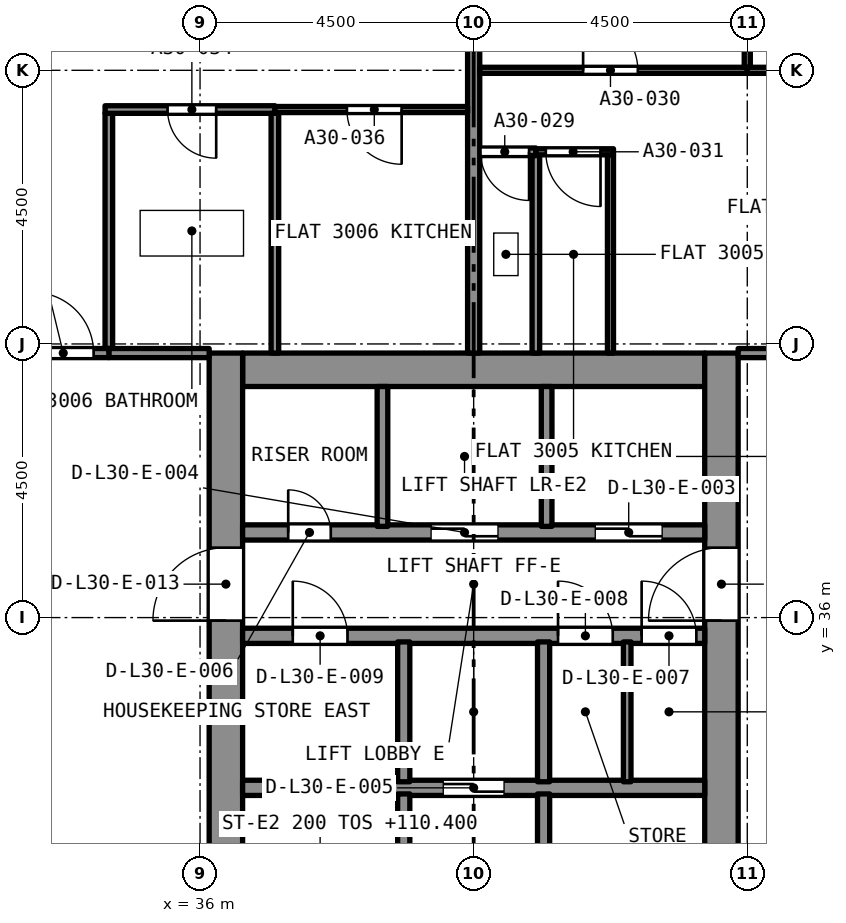
"""IFC4 building model, lengths in metres.
Left out: names, types, materials, properties, quantities, classifications, styles, units other than length and angle.
Written with IfcOpenShell. Run it as: python <this file> out.ifc"""

import sys

from ifc_helpers import new_model, si_unit, direction, frame, frame_2d, origin, place, context, subcontext, project, spatial, rectangle, extrude, element, fill, save


model = new_model("IFC4")
c1 = context("Model", 3, precision=1e-05, world=origin(), true_north=direction((0.0, 1.0)))
c2 = subcontext(c1, "Body", "Model", "MODEL_VIEW")
j1 = project(units=[si_unit("LENGTHUNIT", "METRE"), si_unit("PLANEANGLEUNIT", "RADIAN")], contexts=[c1])
p1 = place(None, origin())
s1 = spatial("IfcSite", under=j1, at=p1, CompositionType="ELEMENT")
p2 = place(p1, origin())
s2 = spatial("IfcBuilding", under=s1, at=p2, CompositionType="ELEMENT")
p3 = place(p2, frame((0.0, 0.0, 108.8)))
s3 = spatial("IfcBuildingStorey", under=s2, at=p3, CompositionType="ELEMENT", Elevation=108.8)
p4 = place(p3, frame((36.7, 40.075, 0.0), z_axis=(0.0, 0.0, 1.0), x_axis=(1.0, 0.0, 0.0)))
e1 = element("IfcWall", 1, at=p4, inside=s3, PredefinedType="SOLIDWALL", context=c2, shape_type="SweptSolid", body=[
    extrude(rectangle(XDim=7.6, YDim=0.55, at=frame_2d((3.8, 0.0))), origin(), (0.0, 0.0, 1.0), 3.2),
])
p5 = place(p3, frame((36.425, 27.15, 0.0), z_axis=(0.0, 0.0, 1.0), x_axis=(0.0, 1.0, 0.0)))
e2 = element("IfcWall", 2, at=p5, inside=s3, PredefinedType="SOLIDWALL", context=c2, shape_type="SweptSolid", body=[
    extrude(rectangle(XDim=13.2, YDim=0.55, at=frame_2d((6.6, 0.0))), origin(), (0.0, 0.0, 1.0), 3.2),
])
p6 = place(p5, frame((8.8, 0.0, 0.0)))
e3 = element("IfcOpeningElement", 3, at=p6, cuts=e2, PredefinedType="OPENING", context=c2, shape_type="SweptSolid", body=[
    extrude(rectangle(XDim=1.2, YDim=2.1, at=frame_2d((0.6, 1.05))), frame((0.0, 0.285, 0.0), z_axis=(0.0, -1.0, 0.0), x_axis=(1.0, 0.0, 0.0)), (0.0, 0.0, 1.0), 0.57),
])
p7 = place(p3, frame((44.575, 27.15, 0.0), z_axis=(0.0, 0.0, 1.0), x_axis=(0.0, 1.0, 0.0)))
e4 = element("IfcWall", 4, at=p7, inside=s3, PredefinedType="SOLIDWALL", context=c2, shape_type="SweptSolid", body=[
    extrude(rectangle(XDim=13.2, YDim=0.55, at=frame_2d((6.6, 0.0))), origin(), (0.0, 0.0, 1.0), 3.2),
])
p8 = place(p7, frame((8.8, 0.0, 0.0)))
e5 = element("IfcOpeningElement", 5, at=p8, cuts=e4, PredefinedType="OPENING", context=c2, shape_type="SweptSolid", body=[
    extrude(rectangle(XDim=1.2, YDim=2.1, at=frame_2d((0.6, 1.05))), frame((0.0, 0.285, 0.0), z_axis=(0.0, -1.0, 0.0), x_axis=(1.0, 0.0, 0.0)), (0.0, 0.0, 1.0), 0.57),
])
p9 = place(p3, frame((41.523, 43.66, 0.0), z_axis=(0.0, 0.0, 1.0), x_axis=(-1.0, 0.0, 0.0)))
e6 = element("IfcWall", 6, at=p9, inside=s3, PredefinedType="PARTITIONING", context=c2, shape_type="SweptSolid", body=[
    extrude(rectangle(XDim=0.923, YDim=0.125, at=frame_2d((0.461, 0.0))), origin(), (0.0, 0.0, 1.0), 2.9),
])
p10 = place(p9, frame((0.111, 0.0, 0.0)))
e7 = element("IfcOpeningElement", 7, at=p10, cuts=e6, PredefinedType="OPENING", context=c2, shape_type="SweptSolid", body=[
    extrude(rectangle(XDim=0.8, YDim=2.1, at=frame_2d((0.4, 1.05))), frame((0.0, 0.073, 0.0), z_axis=(0.0, -1.0, 0.0), x_axis=(1.0, 0.0, 0.0)), (0.0, 0.0, 1.0), 0.145),
])
p11 = place(p3, frame((41.523, 40.35, 0.0), z_axis=(0.0, 0.0, 1.0), x_axis=(0.0, 1.0, 0.0)))
e8 = element("IfcWall", 8, at=p11, inside=s3, PredefinedType="PARTITIONING", context=c2, shape_type="SweptSolid", body=[
    extrude(rectangle(XDim=3.247, YDim=0.125, at=frame_2d((1.624, 0.0))), origin(), (0.0, 0.0, 1.0), 2.9),
])
p12 = place(p3, frame((40.5, 40.35, 0.0), z_axis=(0.0, 0.0, 1.0), x_axis=(0.0, 1.0, 0.0)))
e9 = element("IfcWall", 9, at=p12, inside=s3, PredefinedType="PARTITIONING", context=c2, shape_type="SweptSolid", body=[
    extrude(rectangle(XDim=8.575, YDim=0.2, at=frame_2d((4.288, 0.0))), origin(), (0.0, 0.0, 1.0), 2.9),
])
p13 = place(p3, frame((40.6, 45.0, 0.0), z_axis=(0.0, 0.0, 1.0), x_axis=(1.0, 0.0, 0.0)))
e10 = element("IfcWall", 10, at=p13, inside=s3, PredefinedType="PARTITIONING", context=c2, shape_type="SweptSolid", body=[
    extrude(rectangle(XDim=4.4, YDim=0.1, at=frame_2d((2.2, 0.0))), origin(), (0.0, 0.0, 1.0), 2.9),
])
p14 = place(p13, frame((1.7, 0.0, 0.0)))
e11 = element("IfcOpeningElement", 11, at=p14, cuts=e10, PredefinedType="OPENING", context=c2, shape_type="SweptSolid", body=[
    extrude(rectangle(XDim=0.9, YDim=2.1, at=frame_2d((0.45, 1.05))), frame((0.0, 0.06, 0.0), z_axis=(0.0, -1.0, 0.0), x_axis=(1.0, 0.0, 0.0)), (0.0, 0.0, 1.0), 0.12),
])
p15 = place(p3, frame((45.0, 45.05, 0.0), z_axis=(0.0, 0.0, 1.0), x_axis=(0.0, 1.0, 0.0)))
e12 = element("IfcWall", 12, at=p15, inside=s3, PredefinedType="PARTITIONING", context=c2, shape_type="SweptSolid", body=[
    extrude(rectangle(XDim=3.828, YDim=0.1, at=frame_2d((1.914, 0.0))), origin(), (0.0, 0.0, 1.0), 2.9),
])
p16 = place(p3, frame((42.75, 40.35, 0.0), z_axis=(0.0, 0.0, 1.0), x_axis=(0.0, 1.0, 0.0)))
e13 = element("IfcWall", 13, at=p16, inside=s3, PredefinedType="PARTITIONING", context=c2, shape_type="SweptSolid", body=[
    extrude(rectangle(XDim=3.26, YDim=0.1, at=frame_2d((1.63, 0.0))), origin(), (0.0, 0.0, 1.0), 2.9),
])
p17 = place(p3, frame((42.8, 43.66, 0.0), z_axis=(0.0, 0.0, 1.0), x_axis=(-1.0, 0.0, 0.0)))
e14 = element("IfcWall", 14, at=p17, inside=s3, PredefinedType="PARTITIONING", context=c2, shape_type="SweptSolid", body=[
    extrude(rectangle(XDim=1.277, YDim=0.1, at=frame_2d((0.639, 0.0))), origin(), (0.0, 0.0, 1.0), 2.9),
])
p18 = place(p17, frame((0.214, 0.0, 0.0)))
e15 = element("IfcOpeningElement", 15, at=p18, cuts=e14, PredefinedType="OPENING", context=c2, shape_type="SweptSolid", body=[
    extrude(rectangle(XDim=0.9, YDim=2.1, at=frame_2d((0.45, 1.05))), frame((0.0, 0.06, 0.0), z_axis=(0.0, -1.0, 0.0), x_axis=(1.0, 0.0, 0.0)), (0.0, 0.0, 1.0), 0.12),
])
p19 = place(p3, frame((45.0, 45.0, 0.0), z_axis=(0.0, 0.0, 1.0), x_axis=(1.0, 0.0, 0.0)))
e16 = element("IfcWall", 16, at=p19, inside=s3, PredefinedType="PARTITIONING", context=c2, shape_type="SweptSolid", body=[
    extrude(rectangle(XDim=3.878, YDim=0.1, at=frame_2d((1.939, 0.0))), origin(), (0.0, 0.0, 1.0), 2.9),
])
p20 = place(p19, frame((1.462, 0.0, 0.0)))
e17 = element("IfcOpeningElement", 17, at=p20, cuts=e16, PredefinedType="OPENING", context=c2, shape_type="SweptSolid", body=[
    extrude(rectangle(XDim=1.0, YDim=2.1, at=frame_2d((0.5, 1.05))), frame((0.0, 0.06, 0.0), z_axis=(0.0, -1.0, 0.0), x_axis=(1.0, 0.0, 0.0)), (0.0, 0.0, 1.0), 0.12),
])
p21 = place(p3, frame((44.85, 40.35, 0.0), z_axis=(0.0, 0.0, 1.0), x_axis=(1.0, 0.0, 0.0)))
e18 = element("IfcWall", 18, at=p21, inside=s3, PredefinedType="PARTITIONING", context=c2, shape_type="SweptSolid", body=[
    extrude(rectangle(XDim=4.075, YDim=0.15, at=frame_2d((2.038, 0.0))), origin(), (0.0, 0.0, 1.0), 2.9),
])
p22 = place(p21, frame((1.9, 0.0, 0.0)))
e19 = element("IfcOpeningElement", 19, at=p22, cuts=e18, PredefinedType="OPENING", context=c2, shape_type="SweptSolid", body=[
    extrude(rectangle(XDim=1.0, YDim=2.1, at=frame_2d((0.5, 1.05))), frame((0.0, 0.085, 0.0), z_axis=(0.0, -1.0, 0.0), x_axis=(1.0, 0.0, 0.0)), (0.0, 0.0, 1.0), 0.17),
])
p23 = place(p3, frame((34.5, 40.425, 0.0), z_axis=(0.0, 0.0, 1.0), x_axis=(0.0, 1.0, 0.0)))
e20 = element("IfcWall", 20, at=p23, inside=s3, PredefinedType="PARTITIONING", context=c2, shape_type="SweptSolid", body=[
    extrude(rectangle(XDim=3.867, YDim=0.125, at=frame_2d((1.934, 0.0))), origin(), (0.0, 0.0, 1.0), 2.9),
])
p24 = place(p3, frame((37.231, 44.355, 0.0), z_axis=(0.0, 0.0, 1.0), x_axis=(-1.0, 0.0, 0.0)))
e21 = element("IfcWall", 21, at=p24, inside=s3, PredefinedType="PARTITIONING", context=c2, shape_type="SweptSolid", body=[
    extrude(rectangle(XDim=2.794, YDim=0.125, at=frame_2d((1.397, 0.0))), origin(), (0.0, 0.0, 1.0), 2.9),
])
p25 = place(p24, frame((0.966, 0.0, 0.0)))
e22 = element("IfcOpeningElement", 22, at=p25, cuts=e21, PredefinedType="OPENING", context=c2, shape_type="SweptSolid", body=[
    extrude(rectangle(XDim=0.8, YDim=2.1, at=frame_2d((0.4, 1.05))), frame((0.0, 0.073, 0.0), z_axis=(0.0, -1.0, 0.0), x_axis=(1.0, 0.0, 0.0)), (0.0, 0.0, 1.0), 0.145),
])
p26 = place(p3, frame((37.231, 40.35, 0.0), z_axis=(0.0, 0.0, 1.0), x_axis=(0.0, 1.0, 0.0)))
e23 = element("IfcWall", 23, at=p26, inside=s3, PredefinedType="PARTITIONING", context=c2, shape_type="SweptSolid", body=[
    extrude(rectangle(XDim=3.942, YDim=0.125, at=frame_2d((1.971, 0.0))), origin(), (0.0, 0.0, 1.0), 2.9),
])
p27 = place(p3, frame((34.5, 40.35, 0.0), z_axis=(0.0, 0.0, 1.0), x_axis=(1.0, 0.0, 0.0)))
e24 = element("IfcWall", 24, at=p27, inside=s3, PredefinedType="PARTITIONING", context=c2, shape_type="SweptSolid", body=[
    extrude(rectangle(XDim=1.65, YDim=0.15, at=frame_2d((0.825, 0.0))), origin(), (0.0, 0.0, 1.0), 2.9),
])
p28 = place(p3, frame((40.4, 44.355, 0.0), z_axis=(0.0, 0.0, 1.0), x_axis=(-1.0, 0.0, 0.0)))
e25 = element("IfcWall", 25, at=p28, inside=s3, PredefinedType="PARTITIONING", context=c2, shape_type="SweptSolid", body=[
    extrude(rectangle(XDim=3.168, YDim=0.1, at=frame_2d((1.584, 0.0))), origin(), (0.0, 0.0, 1.0), 2.9),
])
p29 = place(p28, frame((1.084, 0.0, 0.0)))
e26 = element("IfcOpeningElement", 26, at=p29, cuts=e25, PredefinedType="OPENING", context=c2, shape_type="SweptSolid", body=[
    extrude(rectangle(XDim=0.9, YDim=2.1, at=frame_2d((0.45, 1.05))), frame((0.0, 0.06, 0.0), z_axis=(0.0, -1.0, 0.0), x_axis=(1.0, 0.0, 0.0)), (0.0, 0.0, 1.0), 0.12),
])
p30 = place(p3, frame((32.075, 40.35, 0.0), z_axis=(0.0, 0.0, 1.0), x_axis=(1.0, 0.0, 0.0)))
e27 = element("IfcWall", 27, at=p30, inside=s3, PredefinedType="PARTITIONING", context=c2, shape_type="SweptSolid", body=[
    extrude(rectangle(XDim=2.425, YDim=0.15, at=frame_2d((1.212, 0.0))), origin(), (0.0, 0.0, 1.0), 2.9),
])
p31 = place(p30, frame((1.175, 0.0, 0.0)))
e28 = element("IfcOpeningElement", 28, at=p31, cuts=e27, PredefinedType="OPENING", context=c2, shape_type="SweptSolid", body=[
    extrude(rectangle(XDim=1.0, YDim=2.1, at=frame_2d((0.5, 1.05))), frame((0.0, 0.085, 0.0), z_axis=(0.0, -1.0, 0.0), x_axis=(1.0, 0.0, 0.0)), (0.0, 0.0, 1.0), 0.17),
])
p32 = place(p3, frame((36.7, 33.2, 0.0), z_axis=(0.0, 0.0, 1.0), x_axis=(1.0, 0.0, 0.0)))
e29 = element("IfcWall", 29, at=p32, inside=s3, PredefinedType="SOLIDWALL", context=c2, shape_type="SweptSolid", body=[
    extrude(rectangle(XDim=7.6, YDim=0.25, at=frame_2d((3.8, 0.0))), origin(), (0.0, 0.0, 1.0), 2.9),
])
p33 = place(p32, frame((3.3, 0.0, 0.0)))
e30 = element("IfcOpeningElement", 30, at=p33, cuts=e29, PredefinedType="OPENING", context=c2, shape_type="SweptSolid", body=[
    extrude(rectangle(XDim=1.0, YDim=2.1, at=frame_2d((0.5, 1.05))), frame((0.0, 0.135, 0.0), z_axis=(0.0, -1.0, 0.0), x_axis=(1.0, 0.0, 0.0)), (0.0, 0.0, 1.0), 0.27),
])
p34 = place(p3, frame((36.7, 35.7, 0.0), z_axis=(0.0, 0.0, 1.0), x_axis=(1.0, 0.0, 0.0)))
e31 = element("IfcWall", 31, at=p34, inside=s3, PredefinedType="SOLIDWALL", context=c2, shape_type="SweptSolid", body=[
    extrude(rectangle(XDim=7.6, YDim=0.25, at=frame_2d((3.8, 0.0))), origin(), (0.0, 0.0, 1.0), 2.9),
])
p35 = place(p34, frame((6.562, 0.0, 0.0)))
e32 = element("IfcOpeningElement", 32, at=p35, cuts=e31, PredefinedType="OPENING", context=c2, shape_type="SweptSolid", body=[
    extrude(rectangle(XDim=0.9, YDim=2.1, at=frame_2d((0.45, 1.05))), frame((0.0, 0.135, 0.0), z_axis=(0.0, -1.0, 0.0), x_axis=(1.0, 0.0, 0.0)), (0.0, 0.0, 1.0), 0.27),
])
p36 = place(p34, frame((5.188, 0.0, 0.0)))
e33 = element("IfcOpeningElement", 33, at=p36, cuts=e31, PredefinedType="OPENING", context=c2, shape_type="SweptSolid", body=[
    extrude(rectangle(XDim=0.9, YDim=2.1, at=frame_2d((0.45, 1.05))), frame((0.0, 0.135, 0.0), z_axis=(0.0, -1.0, 0.0), x_axis=(1.0, 0.0, 0.0)), (0.0, 0.0, 1.0), 0.27),
])
p37 = place(p34, frame((0.825, 0.0, 0.0)))
e34 = element("IfcOpeningElement", 34, at=p37, cuts=e31, PredefinedType="OPENING", context=c2, shape_type="SweptSolid", body=[
    extrude(rectangle(XDim=0.9, YDim=2.1, at=frame_2d((0.45, 1.05))), frame((0.0, 0.135, 0.0), z_axis=(0.0, -1.0, 0.0), x_axis=(1.0, 0.0, 0.0)), (0.0, 0.0, 1.0), 0.27),
])
p38 = place(p3, frame((36.7, 37.4, 0.0), z_axis=(0.0, 0.0, 1.0), x_axis=(1.0, 0.0, 0.0)))
e35 = element("IfcWall", 35, at=p38, inside=s3, PredefinedType="SOLIDWALL", context=c2, shape_type="SweptSolid", body=[
    extrude(rectangle(XDim=7.6, YDim=0.25, at=frame_2d((3.8, 0.0))), origin(), (0.0, 0.0, 1.0), 2.9),
])
p39 = place(p38, frame((5.8, 0.0, 0.0)))
e36 = element("IfcOpeningElement", 36, at=p39, cuts=e35, PredefinedType="OPENING", context=c2, shape_type="SweptSolid", body=[
    extrude(rectangle(XDim=1.1, YDim=2.4, at=frame_2d((0.55, 1.2))), frame((0.0, 0.135, 0.0), z_axis=(0.0, -1.0, 0.0), x_axis=(1.0, 0.0, 0.0)), (0.0, 0.0, 1.0), 0.27),
])
p40 = place(p38, frame((3.1, 0.0, 0.0)))
e37 = element("IfcOpeningElement", 37, at=p40, cuts=e35, PredefinedType="OPENING", context=c2, shape_type="SweptSolid", body=[
    extrude(rectangle(XDim=1.1, YDim=2.4, at=frame_2d((0.55, 1.2))), frame((0.0, 0.135, 0.0), z_axis=(0.0, -1.0, 0.0), x_axis=(1.0, 0.0, 0.0)), (0.0, 0.0, 1.0), 0.27),
])
p41 = place(p38, frame((0.75, 0.0, 0.0)))
e38 = element("IfcOpeningElement", 38, at=p41, cuts=e35, PredefinedType="OPENING", context=c2, shape_type="SweptSolid", body=[
    extrude(rectangle(XDim=0.7, YDim=2.1, at=frame_2d((0.35, 1.05))), frame((0.0, 0.135, 0.0), z_axis=(0.0, -1.0, 0.0), x_axis=(1.0, 0.0, 0.0)), (0.0, 0.0, 1.0), 0.27),
])
p42 = place(p3, frame((41.65, 27.7, 0.0), z_axis=(0.0, 0.0, 1.0), x_axis=(0.0, 1.0, 0.0)))
e39 = element("IfcWall", 39, at=p42, inside=s3, PredefinedType="SOLIDWALL", context=c2, shape_type="SweptSolid", body=[
    extrude(rectangle(XDim=5.4, YDim=0.2, at=frame_2d((2.7, 0.0))), origin(), (0.0, 0.0, 1.0), 2.9),
])
p43 = place(p42, frame((0.2, 0.0, 0.0)))
e40 = element("IfcOpeningElement", 40, at=p43, cuts=e39, PredefinedType="OPENING", context=c2, shape_type="SweptSolid", body=[
    extrude(rectangle(XDim=0.9, YDim=2.1, at=frame_2d((0.45, 1.05))), frame((0.0, 0.11, 0.0), z_axis=(0.0, -1.0, 0.0), x_axis=(1.0, 0.0, 0.0)), (0.0, 0.0, 1.0), 0.22),
])
p44 = place(p3, frame((39.35, 27.7, 0.0), z_axis=(0.0, 0.0, 1.0), x_axis=(0.0, 1.0, 0.0)))
e41 = element("IfcWall", 41, at=p44, inside=s3, PredefinedType="SOLIDWALL", context=c2, shape_type="SweptSolid", body=[
    extrude(rectangle(XDim=5.4, YDim=0.2, at=frame_2d((2.7, 0.0))), origin(), (0.0, 0.0, 1.0), 2.9),
])
p45 = place(p44, frame((0.2, 0.0, 0.0)))
e42 = element("IfcOpeningElement", 42, at=p45, cuts=e41, PredefinedType="OPENING", context=c2, shape_type="SweptSolid", body=[
    extrude(rectangle(XDim=0.9, YDim=2.1, at=frame_2d((0.45, 1.05))), frame((0.0, 0.11, 0.0), z_axis=(0.0, -1.0, 0.0), x_axis=(1.0, 0.0, 0.0)), (0.0, 0.0, 1.0), 0.22),
])
for number, where, z_axis, x_axis in (
    (43, (41.65, 33.3, 0.0), (0.0, 0.0, 1.0), (0.0, 1.0, 0.0)),
    (44, (39.35, 33.3, 0.0), (0.0, 0.0, 1.0), (0.0, 1.0, 0.0)),
):
    element("IfcWall", number, at=place(p3, frame(where, z_axis=z_axis, x_axis=x_axis)), inside=s3, PredefinedType="SOLIDWALL", context=c2, shape_type="SweptSolid", body=[
        extrude(rectangle(XDim=2.3, YDim=0.2, at=frame_2d((1.15, 0.0))), origin(), (0.0, 0.0, 1.0), 2.9),
    ])
for number, where, z_axis, x_axis in (
    (45, (41.7, 37.5, 0.0), (0.0, 0.0, 1.0), (0.0, 1.0, 0.0)),
    (46, (39.0, 37.5, 0.0), (0.0, 0.0, 1.0), (0.0, 1.0, 0.0)),
):
    element("IfcWall", number, at=place(p3, frame(where, z_axis=z_axis, x_axis=x_axis)), inside=s3, PredefinedType="SOLIDWALL", context=c2, shape_type="SweptSolid", body=[
        extrude(rectangle(XDim=2.3, YDim=0.175, at=frame_2d((1.15, 0.0))), origin(), (0.0, 0.0, 1.0), 2.9),
    ])
p46 = place(p3, frame((43.025, 33.3, 0.0), z_axis=(0.0, 0.0, 1.0), x_axis=(0.0, 1.0, 0.0)))
e47 = element("IfcWall", 47, at=p46, inside=s3, PredefinedType="PARTITIONING", context=c2, shape_type="SweptSolid", body=[
    extrude(rectangle(XDim=2.3, YDim=0.125, at=frame_2d((1.15, 0.0))), origin(), (0.0, 0.0, 1.0), 2.9),
])
p47 = place(p10, origin())
e48 = element("IfcDoor", 48, at=p47, inside=s3, OperationType="SINGLE_SWING_RIGHT", PredefinedType="DOOR", context=c2, shape_type="SweptSolid", body=[
    extrude(rectangle(XDim=0.8, YDim=2.1, at=frame_2d((0.4, 1.05))), frame((0.0, 0.025, 0.0), z_axis=(0.0, -1.0, 0.0), x_axis=(1.0, 0.0, 0.0)), (0.0, 0.0, 1.0), 0.05),
])
fill(e7, e48)
p48 = place(p14, origin())
e49 = element("IfcDoor", 49, at=p48, inside=s3, OperationType="SINGLE_SWING_LEFT", PredefinedType="DOOR", context=c2, shape_type="SweptSolid", body=[
    extrude(rectangle(XDim=0.9, YDim=2.1, at=frame_2d((0.45, 1.05))), frame((0.0, 0.025, 0.0), z_axis=(0.0, -1.0, 0.0), x_axis=(1.0, 0.0, 0.0)), (0.0, 0.0, 1.0), 0.05),
])
fill(e11, e49)
p49 = place(p18, origin())
e50 = element("IfcDoor", 50, at=p49, inside=s3, OperationType="SINGLE_SWING_RIGHT", PredefinedType="DOOR", context=c2, shape_type="SweptSolid", body=[
    extrude(rectangle(XDim=0.9, YDim=2.1, at=frame_2d((0.45, 1.05))), frame((0.0, 0.025, 0.0), z_axis=(0.0, -1.0, 0.0), x_axis=(1.0, 0.0, 0.0)), (0.0, 0.0, 1.0), 0.05),
])
fill(e15, e50)
p50 = place(p25, origin())
e51 = element("IfcDoor", 51, at=p50, inside=s3, OperationType="SINGLE_SWING_LEFT", PredefinedType="DOOR", context=c2, shape_type="SweptSolid", body=[
    extrude(rectangle(XDim=0.8, YDim=2.1, at=frame_2d((0.4, 1.05))), frame((0.0, 0.025, 0.0), z_axis=(0.0, -1.0, 0.0), x_axis=(1.0, 0.0, 0.0)), (0.0, 0.0, 1.0), 0.05),
])
fill(e22, e51)
p51 = place(p29, origin())
e52 = element("IfcDoor", 52, at=p51, inside=s3, OperationType="SINGLE_SWING_LEFT", PredefinedType="DOOR", context=c2, shape_type="SweptSolid", body=[
    extrude(rectangle(XDim=0.9, YDim=2.1, at=frame_2d((0.45, 1.05))), frame((0.0, 0.025, 0.0), z_axis=(0.0, -1.0, 0.0), x_axis=(1.0, 0.0, 0.0)), (0.0, 0.0, 1.0), 0.05),
])
fill(e26, e52)
p52 = place(p31, origin())
e53 = element("IfcDoor", 53, at=p52, inside=s3, OperationType="SINGLE_SWING_RIGHT", PredefinedType="DOOR", context=c2, shape_type="SweptSolid", body=[
    extrude(rectangle(XDim=1.0, YDim=2.1, at=frame_2d((0.5, 1.05))), frame((0.0, 0.025, 0.0), z_axis=(0.0, -1.0, 0.0), x_axis=(1.0, 0.0, 0.0)), (0.0, 0.0, 1.0), 0.05),
])
fill(e28, e53)
p53 = place(p39, origin())
e54 = element("IfcDoor", 54, at=p53, inside=s3, OperationType="SLIDING_TO_LEFT", PredefinedType="DOOR", context=c2, shape_type="SweptSolid", body=[
    extrude(rectangle(XDim=1.1, YDim=2.4, at=frame_2d((0.55, 1.2))), frame((0.0, 0.025, 0.0), z_axis=(0.0, -1.0, 0.0), x_axis=(1.0, 0.0, 0.0)), (0.0, 0.0, 1.0), 0.05),
])
fill(e36, e54)
p54 = place(p40, origin())
e55 = element("IfcDoor", 55, at=p54, inside=s3, OperationType="SLIDING_TO_LEFT", PredefinedType="DOOR", context=c2, shape_type="SweptSolid", body=[
    extrude(rectangle(XDim=1.1, YDim=2.4, at=frame_2d((0.55, 1.2))), frame((0.0, 0.025, 0.0), z_axis=(0.0, -1.0, 0.0), x_axis=(1.0, 0.0, 0.0)), (0.0, 0.0, 1.0), 0.05),
])
fill(e37, e55)
p55 = place(p33, origin())
e56 = element("IfcDoor", 56, at=p55, inside=s3, OperationType="SLIDING_TO_LEFT", PredefinedType="DOOR", context=c2, shape_type="SweptSolid", body=[
    extrude(rectangle(XDim=1.0, YDim=2.1, at=frame_2d((0.5, 1.05))), frame((0.0, 0.025, 0.0), z_axis=(0.0, -1.0, 0.0), x_axis=(1.0, 0.0, 0.0)), (0.0, 0.0, 1.0), 0.05),
])
fill(e30, e56)
p56 = place(p41, origin())
e57 = element("IfcDoor", 57, at=p56, inside=s3, OperationType="SINGLE_SWING_LEFT", PredefinedType="DOOR", context=c2, shape_type="SweptSolid", body=[
    extrude(rectangle(XDim=0.7, YDim=2.1, at=frame_2d((0.35, 1.05))), frame((0.0, 0.025, 0.0), z_axis=(0.0, -1.0, 0.0), x_axis=(1.0, 0.0, 0.0)), (0.0, 0.0, 1.0), 0.05),
])
fill(e38, e57)
p57 = place(p35, origin())
e58 = element("IfcDoor", 58, at=p57, inside=s3, OperationType="SINGLE_SWING_LEFT", PredefinedType="DOOR", context=c2, shape_type="SweptSolid", body=[
    extrude(rectangle(XDim=0.9, YDim=2.1, at=frame_2d((0.45, 1.05))), frame((0.0, 0.025, 0.0), z_axis=(0.0, -1.0, 0.0), x_axis=(1.0, 0.0, 0.0)), (0.0, 0.0, 1.0), 0.05),
])
fill(e32, e58)
p58 = place(p36, origin())
e59 = element("IfcDoor", 59, at=p58, inside=s3, OperationType="SINGLE_SWING_LEFT", PredefinedType="DOOR", context=c2, shape_type="SweptSolid", body=[
    extrude(rectangle(XDim=0.9, YDim=2.1, at=frame_2d((0.45, 1.05))), frame((0.0, 0.025, 0.0), z_axis=(0.0, -1.0, 0.0), x_axis=(1.0, 0.0, 0.0)), (0.0, 0.0, 1.0), 0.05),
])
fill(e33, e59)
p59 = place(p37, origin())
e60 = element("IfcDoor", 60, at=p59, inside=s3, OperationType="SINGLE_SWING_LEFT", PredefinedType="DOOR", context=c2, shape_type="SweptSolid", body=[
    extrude(rectangle(XDim=0.9, YDim=2.1, at=frame_2d((0.45, 1.05))), frame((0.0, 0.025, 0.0), z_axis=(0.0, -1.0, 0.0), x_axis=(1.0, 0.0, 0.0)), (0.0, 0.0, 1.0), 0.05),
])
fill(e34, e60)
p60 = place(p6, origin())
e61 = element("IfcDoor", 61, at=p60, inside=s3, OperationType="SINGLE_SWING_LEFT", PredefinedType="DOOR", context=c2, shape_type="SweptSolid", body=[
    extrude(rectangle(XDim=1.2, YDim=2.1, at=frame_2d((0.6, 1.05))), frame((0.0, 0.025, 0.0), z_axis=(0.0, -1.0, 0.0), x_axis=(1.0, 0.0, 0.0)), (0.0, 0.0, 1.0), 0.05),
])
fill(e3, e61)
p61 = place(p8, origin())
e62 = element("IfcDoor", 62, at=p61, inside=s3, OperationType="SINGLE_SWING_LEFT", PredefinedType="DOOR", context=c2, shape_type="SweptSolid", body=[
    extrude(rectangle(XDim=1.2, YDim=2.1, at=frame_2d((0.6, 1.05))), frame((0.0, 0.025, 0.0), z_axis=(0.0, -1.0, 0.0), x_axis=(1.0, 0.0, 0.0)), (0.0, 0.0, 1.0), 0.05),
])
fill(e5, e62)
save(model, sys.argv[1])
